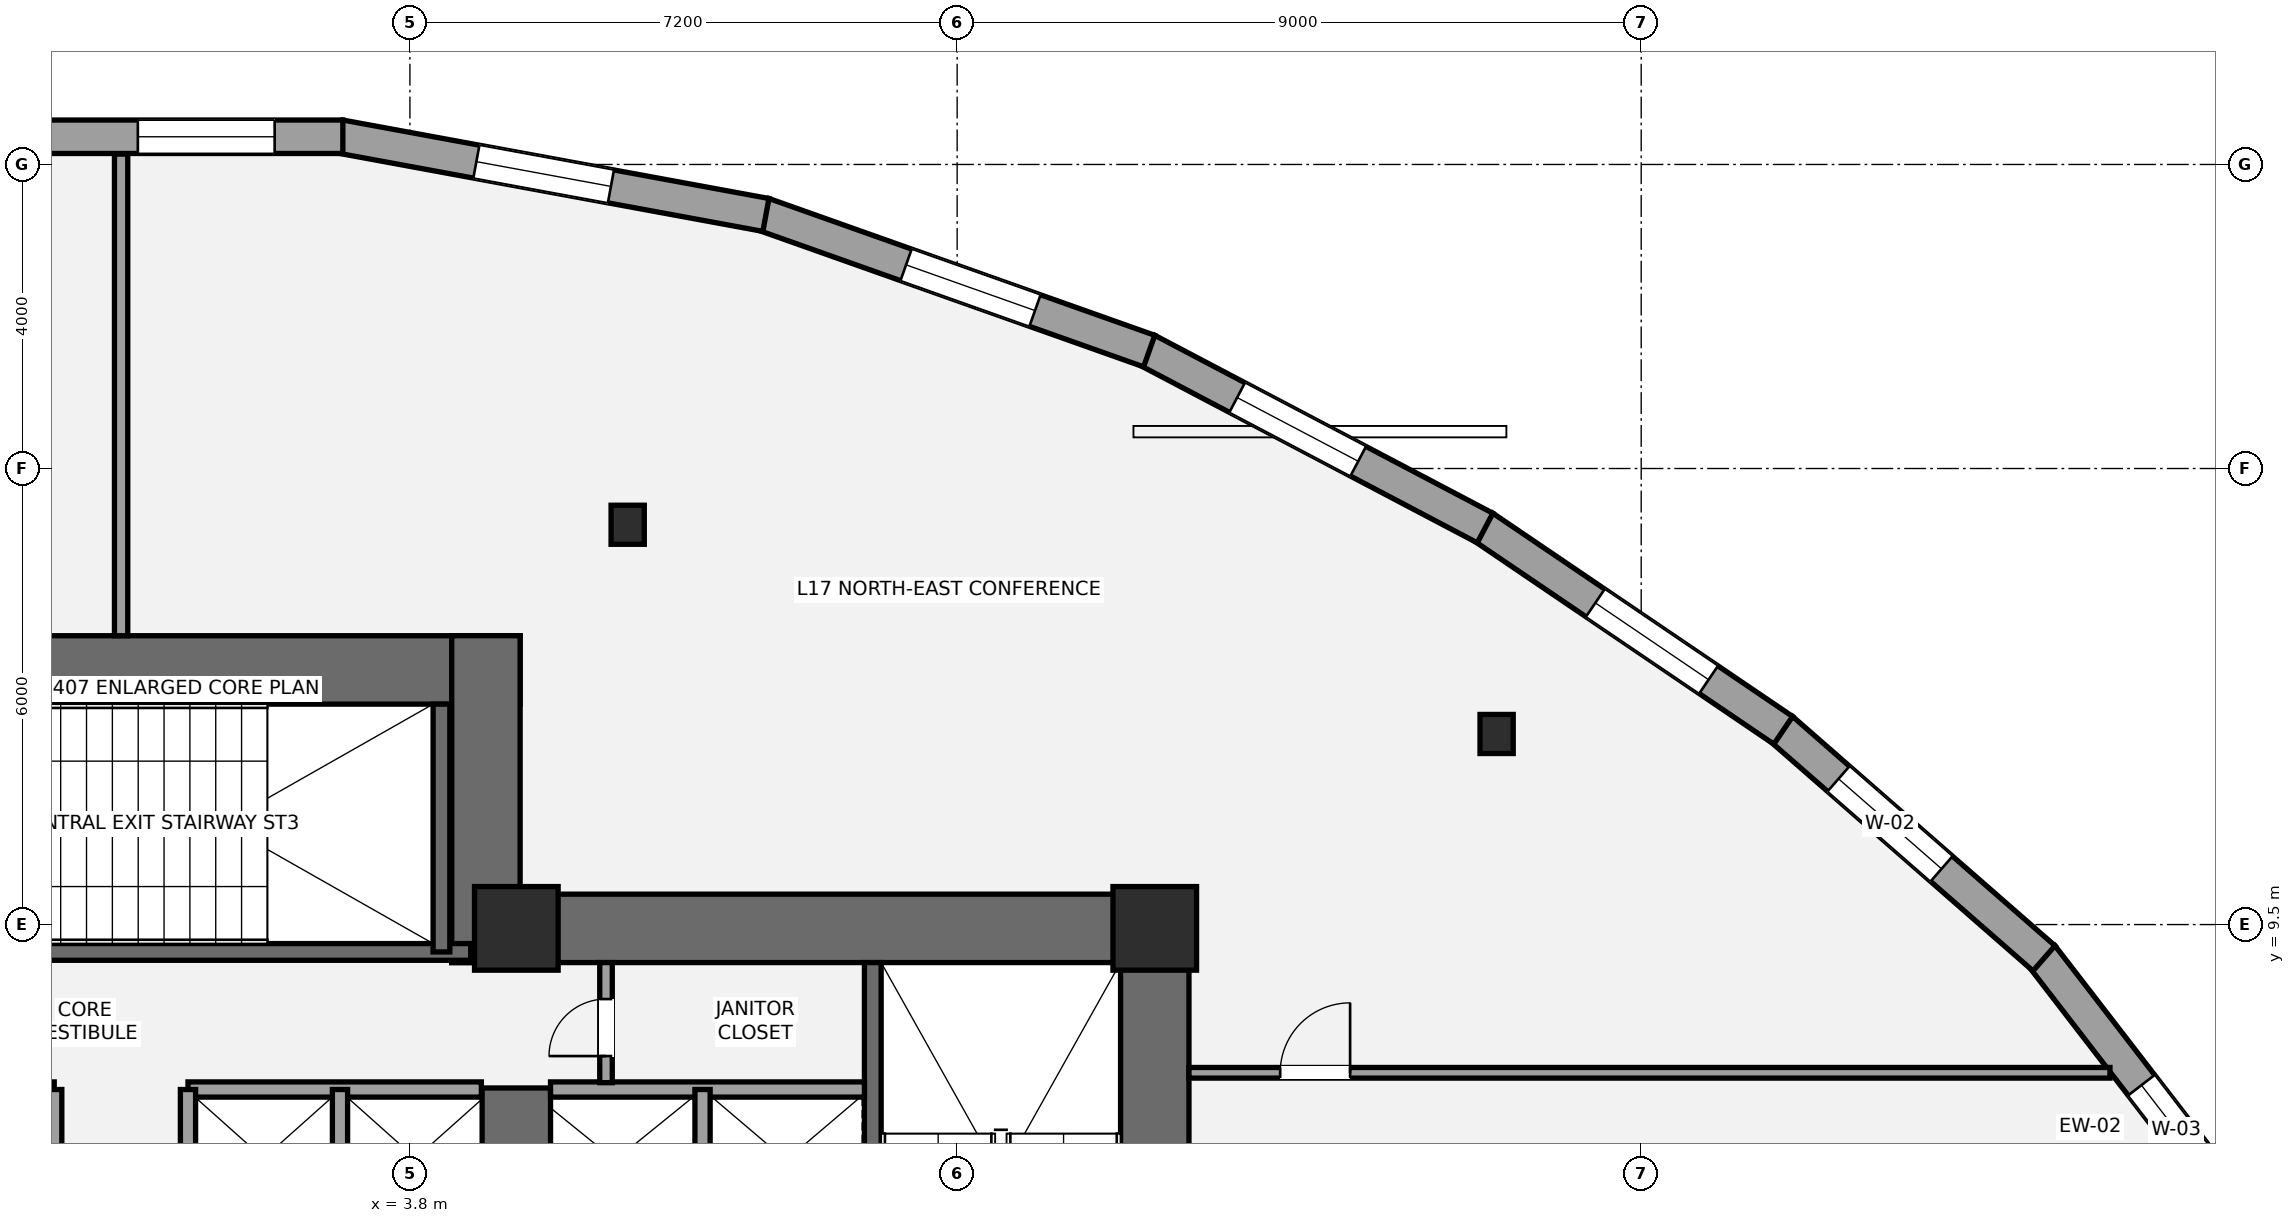
"""IFC4 building model, lengths in metres.
Left out: names, types, materials, properties, quantities, classifications, styles, units other than length and angle.
Written with IfcOpenShell. Run it as: python <this file> out.ifc"""

import sys

from ifc_helpers import new_model, si_unit, direction, frame, frame_2d, origin, origin_2d, place, context, subcontext, project, spatial, rectangle, i_section, extrude, element, fill, save


model = new_model("IFC4")
c1 = context("Model", 3, precision=1e-05, world=origin(), true_north=direction((0.0, 1.0)))
c2 = subcontext(c1, "Body", "Model", "MODEL_VIEW")
j1 = project(units=[si_unit("LENGTHUNIT", "METRE"), si_unit("PLANEANGLEUNIT", "RADIAN")], contexts=[c1])
p1 = place(None, origin())
s1 = spatial("IfcSite", under=j1, at=p1, CompositionType="ELEMENT")
p2 = place(p1, origin())
s2 = spatial("IfcBuilding", under=s1, at=p2, CompositionType="ELEMENT")
p3 = place(p2, frame((0.0, 0.0, 66.6)))
s3 = spatial("IfcBuildingStorey", under=s2, at=p3, CompositionType="ELEMENT", Elevation=66.6)
p4 = place(p3, frame((13.6, 0.95, 0.0), z_axis=(0.0, 0.0, 1.0), x_axis=(0.0, 1.0, 0.0)))
e1 = element("IfcWall", 1, at=p4, inside=s3, PredefinedType="SHEAR", context=c2, shape_type="SweptSolid", body=[
    extrude(rectangle(XDim=8.95, YDim=0.9, at=frame_2d((4.475, 0.0))), origin(), (0.0, 0.0, 1.0), 3.6),
])
p5 = place(p3, frame((4.35, 9.45, 0.0), z_axis=(0.0, 0.0, 1.0), x_axis=(1.0, 0.0, 0.0)))
e2 = element("IfcWall", 2, at=p5, inside=s3, PredefinedType="SHEAR", context=c2, shape_type="SweptSolid", body=[
    extrude(rectangle(XDim=9.7, YDim=0.9, at=frame_2d((4.85, 0.0))), origin(), (0.0, 0.0, 1.0), 3.6),
])
p6 = place(p3, frame((5.2, 5.35, 0.0), z_axis=(0.0, 0.0, 1.0), x_axis=(0.0, 1.0, 0.0)))
e3 = element("IfcWall", 3, at=p6, inside=s3, PredefinedType="SHEAR", context=c2, shape_type="SweptSolid", body=[
    extrude(rectangle(XDim=2.0, YDim=0.9, at=frame_2d((1.0, 0.0))), origin(), (0.0, 0.0, 1.0), 3.6),
])
p7 = place(p3, frame((9.89, 1.85, 0.0), z_axis=(0.0, 0.0, 1.0), x_axis=(0.0, 1.0, 0.0)))
e4 = element("IfcWall", 4, at=p7, inside=s3, PredefinedType="SHEAR", context=c2, shape_type="SweptSolid", body=[
    extrude(rectangle(XDim=7.15, YDim=0.22, at=frame_2d((3.575, 0.0))), origin(), (0.0, 0.0, 1.0), 3.6),
])
p8 = place(p3, frame((-5.25, 12.85, 0.0), z_axis=(0.0, 0.0, 1.0), x_axis=(1.0, 0.0, 0.0)))
e5 = element("IfcWall", 5, at=p8, inside=s3, PredefinedType="SHEAR", context=c2, shape_type="SweptSolid", body=[
    extrude(rectangle(XDim=10.5, YDim=0.9, at=frame_2d((5.25, 0.0))), origin(), (0.0, 0.0, 1.0), 3.6),
])
p9 = place(p3, frame((4.8, 9.0, 0.0), z_axis=(0.0, 0.0, 1.0), x_axis=(0.0, 1.0, 0.0)))
e6 = element("IfcWall", 6, at=p9, inside=s3, PredefinedType="SHEAR", context=c2, shape_type="SweptSolid", body=[
    extrude(rectangle(XDim=4.3, YDim=0.9, at=frame_2d((2.15, 0.0))), origin(), (0.0, 0.0, 1.0), 3.6),
])
p10 = place(p3, frame((-4.7, 9.14, 0.0), z_axis=(0.0, 0.0, 1.0), x_axis=(1.0, 0.0, 0.0)))
e7 = element("IfcWall", 7, at=p10, inside=s3, PredefinedType="SHEAR", context=c2, shape_type="SweptSolid", body=[
    extrude(rectangle(XDim=9.3, YDim=0.22, at=frame_2d((4.65, 0.0))), origin(), (0.0, 0.0, 1.0), 3.6),
])
p11 = place(p10, frame((1.15, 0.0, 0.0)))
e8 = element("IfcOpeningElement", 8, at=p11, cuts=e7, PredefinedType="OPENING", context=c2, shape_type="SweptSolid", body=[
    extrude(rectangle(XDim=1.05, YDim=2.15, at=frame_2d((0.525, 1.075))), frame((0.0, 0.12, 0.0), z_axis=(0.0, -1.0, 0.0), x_axis=(1.0, 0.0, 0.0)), (0.0, 0.0, 1.0), 0.24),
])
p12 = place(p3, frame((4.215, 9.14, 0.0), z_axis=(0.0, 0.0, 1.0), x_axis=(0.0, 1.0, 0.0)))
e9 = element("IfcWall", 9, at=p12, inside=s3, PredefinedType="SHEAR", context=c2, shape_type="SweptSolid", body=[
    extrude(rectangle(XDim=3.26, YDim=0.22, at=frame_2d((1.63, 0.0))), origin(), (0.0, 0.0, 1.0), 3.6),
])
for number, where, z_axis, x_axis in (
    (10, (5.2, 9.45, 0.0), (0.0, 0.0, 1.0), (1.0, 0.0, 0.0)),
    (11, (13.6, 9.45, 0.0), (0.0, 0.0, 1.0), (1.0, 0.0, 0.0)),
):
    element("IfcColumn", number, at=place(p3, frame(where, z_axis=z_axis, x_axis=x_axis)), inside=s3, PredefinedType="COLUMN", context=c2, shape_type="SweptSolid", body=[
        extrude(rectangle(XDim=1.1, YDim=1.1, at=origin_2d()), origin(), (0.0, 0.0, 1.0), 3.6),
    ])
for number, where, z_axis, x_axis in (
    (12, (18.098, 12.007, 0.0), (0.0, 0.0, 1.0), (1.0, 0.0, 0.0)),
    (13, (6.665, 14.76, 0.0), (0.0, 0.0, 1.0), (1.0, 0.0, 0.0)),
):
    element("IfcColumn", number, at=place(p3, frame(where, z_axis=z_axis, x_axis=x_axis)), inside=s3, PredefinedType="COLUMN", context=c2, shape_type="SweptSolid", body=[
        extrude(i_section(OverallWidth=0.437, OverallDepth=0.514, WebThickness=0.061, FlangeThickness=0.097, at=origin_2d()), origin(), (0.0, 0.0, 1.0), 3.6),
    ])
p13 = place(p3, frame((25.27, 9.087, 0.0), z_axis=(0.0, 0.0, 1.0), x_axis=(0.610684735824, -0.791873824187, 0.0)))
e14 = element("IfcWall", 14, at=p13, inside=s3, PredefinedType="STANDARD", context=c2, shape_type="SweptSolid", body=[
    extrude(rectangle(XDim=4.347, YDim=0.44, at=frame_2d((2.173, 0.0))), origin(), (0.0, 0.0, 1.0), 2.529),
])
p14 = place(p13, frame((2.147, 0.0, 0.65)))
e15 = element("IfcOpeningElement", 15, at=p14, cuts=e14, PredefinedType="OPENING", context=c2, shape_type="SweptSolid", body=[
    extrude(rectangle(XDim=1.5, YDim=1.7, at=frame_2d((0.75, 0.85))), frame((0.0, 0.23, 0.0), z_axis=(0.0, -1.0, 0.0), x_axis=(1.0, 0.0, 0.0)), (0.0, 0.0, 1.0), 0.46),
])
p15 = place(p3, frame((21.847, 12.072, 0.0), z_axis=(0.0, 0.0, 1.0), x_axis=(0.753064762529, -0.657946398605, 0.0)))
e16 = element("IfcWall", 16, at=p15, inside=s3, PredefinedType="STANDARD", context=c2, shape_type="SweptSolid", body=[
    extrude(rectangle(XDim=4.584, YDim=0.44, at=frame_2d((2.292, 0.0))), origin(), (0.0, 0.0, 1.0), 2.529),
])
p16 = place(p15, frame((0.995, 0.0, 0.65)))
e17 = element("IfcOpeningElement", 17, at=p16, cuts=e16, PredefinedType="OPENING", context=c2, shape_type="SweptSolid", body=[
    extrude(rectangle(XDim=1.8, YDim=1.7, at=frame_2d((0.9, 0.85))), frame((0.0, 0.23, 0.0), z_axis=(0.0, -1.0, 0.0), x_axis=(1.0, 0.0, 0.0)), (0.0, 0.0, 1.0), 0.46),
])
p17 = place(p3, frame((17.925, 14.729, 0.0), z_axis=(0.0, 0.0, 1.0), x_axis=(0.827689135004, -0.561186863528, 0.0)))
e18 = element("IfcWall", 18, at=p17, inside=s3, PredefinedType="STANDARD", context=c2, shape_type="SweptSolid", body=[
    extrude(rectangle(XDim=4.765, YDim=0.44, at=frame_2d((2.382, 0.0))), origin(), (0.0, 0.0, 1.0), 2.529),
])
p18 = place(p17, frame((1.778, 0.0, 0.65)))
e19 = element("IfcOpeningElement", 19, at=p18, cuts=e18, PredefinedType="OPENING", context=c2, shape_type="SweptSolid", body=[
    extrude(rectangle(XDim=1.8, YDim=1.7, at=frame_2d((0.9, 0.85))), frame((0.0, 0.23, 0.0), z_axis=(0.0, -1.0, 0.0), x_axis=(1.0, 0.0, 0.0)), (0.0, 0.0, 1.0), 0.46),
])
p19 = place(p3, frame((13.498, 17.058, 0.0), z_axis=(0.0, 0.0, 1.0), x_axis=(0.884937186938, -0.465710398395, 0.0)))
e20 = element("IfcWall", 20, at=p19, inside=s3, PredefinedType="STANDARD", context=c2, shape_type="SweptSolid", body=[
    extrude(rectangle(XDim=5.026, YDim=0.44, at=frame_2d((2.513, 0.0))), origin(), (0.0, 0.0, 1.0), 2.529),
])
p20 = place(p19, frame((1.341, 0.0, 0.65)))
e21 = element("IfcOpeningElement", 21, at=p20, cuts=e20, PredefinedType="OPENING", context=c2, shape_type="SweptSolid", body=[
    extrude(rectangle(XDim=1.8, YDim=1.7, at=frame_2d((0.9, 0.85))), frame((0.0, 0.23, 0.0), z_axis=(0.0, -1.0, 0.0), x_axis=(1.0, 0.0, 0.0)), (0.0, 0.0, 1.0), 0.46),
])
p21 = place(p3, frame((8.45, 18.845, 0.0), z_axis=(0.0, 0.0, 1.0), x_axis=(0.942515730584, -0.334161783575, 0.0)))
e22 = element("IfcWall", 22, at=p21, inside=s3, PredefinedType="STANDARD", context=c2, shape_type="SweptSolid", body=[
    extrude(rectangle(XDim=5.386, YDim=0.44, at=frame_2d((2.693, 0.0))), origin(), (0.0, 0.0, 1.0), 2.529),
])
p22 = place(p21, frame((1.992, 0.0, 0.65)))
e23 = element("IfcOpeningElement", 23, at=p22, cuts=e22, PredefinedType="OPENING", context=c2, shape_type="SweptSolid", body=[
    extrude(rectangle(XDim=1.8, YDim=1.7, at=frame_2d((0.9, 0.85))), frame((0.0, 0.23, 0.0), z_axis=(0.0, -1.0, 0.0), x_axis=(1.0, 0.0, 0.0)), (0.0, 0.0, 1.0), 0.46),
])
p23 = place(p3, frame((2.878, 19.868, 0.0), z_axis=(0.0, 0.0, 1.0), x_axis=(0.983468646836, -0.181078493177, 0.0)))
e24 = element("IfcWall", 24, at=p23, inside=s3, PredefinedType="STANDARD", context=c2, shape_type="SweptSolid", body=[
    extrude(rectangle(XDim=5.7, YDim=0.44, at=frame_2d((2.85, 0.0))), origin(), (0.0, 0.0, 1.0), 2.529),
])
p24 = place(p23, frame((1.827, 0.0, 0.65)))
e25 = element("IfcOpeningElement", 25, at=p24, cuts=e24, PredefinedType="OPENING", context=c2, shape_type="SweptSolid", body=[
    extrude(rectangle(XDim=1.8, YDim=1.7, at=frame_2d((0.9, 0.85))), frame((0.0, 0.23, 0.0), z_axis=(0.0, -1.0, 0.0), x_axis=(1.0, 0.0, 0.0)), (0.0, 0.0, 1.0), 0.46),
])
p25 = place(p3, frame((-2.917, 19.865, 0.0), z_axis=(0.0, 0.0, 1.0), x_axis=(1.0, 0.0, 0.0)))
e26 = element("IfcWall", 26, at=p25, inside=s3, PredefinedType="STANDARD", context=c2, shape_type="SweptSolid", body=[
    extrude(rectangle(XDim=5.835, YDim=0.44, at=frame_2d((2.917, 0.0))), origin(), (0.0, 0.0, 1.0), 2.529),
])
p26 = place(p25, frame((3.138, 0.0, 0.65)))
e27 = element("IfcOpeningElement", 27, at=p26, cuts=e26, PredefinedType="OPENING", context=c2, shape_type="SweptSolid", body=[
    extrude(rectangle(XDim=1.8, YDim=1.7, at=frame_2d((0.9, 0.85))), frame((0.0, 0.23, 0.0), z_axis=(0.0, -1.0, 0.0), x_axis=(1.0, 0.0, 0.0)), (0.0, 0.0, 1.0), 0.46),
])
p27 = place(p3, frame((5.65, 7.33, 0.0), z_axis=(0.0, 0.0, 1.0), x_axis=(1.0, 0.0, 0.0)))
e28 = element("IfcWall", 28, at=p27, inside=s3, PredefinedType="SOLIDWALL", context=c2, shape_type="SweptSolid", body=[
    extrude(rectangle(XDim=4.13, YDim=0.2, at=frame_2d((2.065, 0.0))), origin(), (0.0, 0.0, 1.0), 3.4),
])
p28 = place(p3, frame((7.65, 5.47, 0.0), z_axis=(0.0, 0.0, 1.0), x_axis=(0.0, 1.0, 0.0)))
e29 = element("IfcWall", 29, at=p28, inside=s3, PredefinedType="SOLIDWALL", context=c2, shape_type="SweptSolid", body=[
    extrude(rectangle(XDim=1.86, YDim=0.2, at=frame_2d((0.93, 0.0))), origin(), (0.0, 0.0, 1.0), 3.4),
])
for number, where, z_axis, x_axis in (
    (30, (-4.74, 7.33, 0.0), (0.0, 0.0, 1.0), (1.0, 0.0, 0.0)),
    (31, (0.88, 7.33, 0.0), (0.0, 0.0, 1.0), (1.0, 0.0, 0.0)),
):
    element("IfcWall", number, at=place(p3, frame(where, z_axis=z_axis, x_axis=x_axis)), inside=s3, PredefinedType="SOLIDWALL", context=c2, shape_type="SweptSolid", body=[
        extrude(rectangle(XDim=3.86, YDim=0.2, at=frame_2d((1.93, 0.0))), origin(), (0.0, 0.0, 1.0), 3.4),
    ])
for number, where, z_axis, x_axis in (
    (32, (2.88, 5.52, 0.0), (0.0, 0.0, 1.0), (0.0, 1.0, 0.0)),
    (33, (-0.88, 5.52, 0.0), (0.0, 0.0, 1.0), (0.0, 1.0, 0.0)),
    (34, (0.88, 5.52, 0.0), (0.0, 0.0, 1.0), (0.0, 1.0, 0.0)),
):
    element("IfcWall", number, at=place(p3, frame(where, z_axis=z_axis, x_axis=x_axis)), inside=s3, PredefinedType="SOLIDWALL", context=c2, shape_type="SweptSolid", body=[
        extrude(rectangle(XDim=1.81, YDim=0.2, at=frame_2d((0.905, 0.0))), origin(), (0.0, 0.0, 1.0), 3.4),
    ])
p29 = place(p3, frame((6.38, 7.42, 0.0), z_axis=(0.0, 0.0, 1.0), x_axis=(0.0, 1.0, 0.0)))
e35 = element("IfcWall", 35, at=p29, inside=s3, PredefinedType="PARTITIONING", context=c2, shape_type="SweptSolid", body=[
    extrude(rectangle(XDim=1.58, YDim=0.165, at=frame_2d((0.79, 0.0))), origin(), (0.0, 0.0, 1.0), 3.4),
])
p30 = place(p29, frame((0.35, 0.0, 0.0)))
e36 = element("IfcOpeningElement", 36, at=p30, cuts=e35, PredefinedType="OPENING", context=c2, shape_type="SweptSolid", body=[
    extrude(rectangle(XDim=0.75, YDim=2.1, at=frame_2d((0.375, 1.05))), frame((0.0, 0.093, 0.0), z_axis=(0.0, -1.0, 0.0), x_axis=(1.0, 0.0, 0.0)), (0.0, 0.0, 1.0), 0.185),
])
p31 = place(p3, frame((14.05, 7.55, 0.0), z_axis=(0.0, 0.0, 1.0), x_axis=(1.0, 0.0, 0.0)))
e37 = element("IfcWall", 37, at=p31, inside=s3, PredefinedType="PARTITIONING", context=c2, shape_type="SweptSolid", body=[
    extrude(rectangle(XDim=12.118, YDim=0.14, at=frame_2d((6.059, 0.0))), origin(), (0.0, 0.0, 1.0), 2.853),
])
p32 = place(p31, frame((1.2, 0.0, 0.0)))
e38 = element("IfcOpeningElement", 38, at=p32, cuts=e37, PredefinedType="OPENING", context=c2, shape_type="SweptSolid", body=[
    extrude(rectangle(XDim=0.92, YDim=2.15, at=frame_2d((0.46, 1.075))), frame((0.0, 0.08, 0.0), z_axis=(0.0, -1.0, 0.0), x_axis=(1.0, 0.0, 0.0)), (0.0, 0.0, 1.0), 0.16),
])
p33 = place(p3, frame((0.0, 13.3, 0.0), z_axis=(0.0, 0.0, 1.0), x_axis=(0.0, 1.0, 0.0)))
e39 = element("IfcWall", 39, at=p33, inside=s3, PredefinedType="PARTITIONING", context=c2, shape_type="SweptSolid", body=[
    extrude(rectangle(XDim=6.336, YDim=0.175, at=frame_2d((3.168, 0.0))), origin(), (0.0, 0.0, 1.0), 3.4),
])
p34 = place(p14, origin())
e40 = element("IfcWindow", 40, at=p34, inside=s3, PartitioningType="SINGLE_PANEL", PredefinedType="WINDOW", context=c2, shape_type="SweptSolid", body=[
    extrude(rectangle(XDim=1.5, YDim=1.7, at=frame_2d((0.75, 0.85))), frame((0.0, -0.01, 0.0), z_axis=(0.0, -1.0, 0.0), x_axis=(1.0, 0.0, 0.0)), (0.0, 0.0, 1.0), 0.06),
])
fill(e15, e40)
p35 = place(p16, origin())
e41 = element("IfcWindow", 41, at=p35, inside=s3, PartitioningType="SINGLE_PANEL", PredefinedType="WINDOW", context=c2, shape_type="SweptSolid", body=[
    extrude(rectangle(XDim=1.8, YDim=1.7, at=frame_2d((0.9, 0.85))), frame((0.0, -0.01, 0.0), z_axis=(0.0, -1.0, 0.0), x_axis=(1.0, 0.0, 0.0)), (0.0, 0.0, 1.0), 0.06),
])
fill(e17, e41)
p36 = place(p18, origin())
e42 = element("IfcWindow", 42, at=p36, inside=s3, PartitioningType="SINGLE_PANEL", PredefinedType="WINDOW", context=c2, shape_type="SweptSolid", body=[
    extrude(rectangle(XDim=1.8, YDim=1.7, at=frame_2d((0.9, 0.85))), frame((0.0, -0.01, 0.0), z_axis=(0.0, -1.0, 0.0), x_axis=(1.0, 0.0, 0.0)), (0.0, 0.0, 1.0), 0.06),
])
fill(e19, e42)
p37 = place(p20, origin())
e43 = element("IfcWindow", 43, at=p37, inside=s3, PartitioningType="SINGLE_PANEL", PredefinedType="WINDOW", context=c2, shape_type="SweptSolid", body=[
    extrude(rectangle(XDim=1.8, YDim=1.7, at=frame_2d((0.9, 0.85))), frame((0.0, -0.01, 0.0), z_axis=(0.0, -1.0, 0.0), x_axis=(1.0, 0.0, 0.0)), (0.0, 0.0, 1.0), 0.06),
])
fill(e21, e43)
p38 = place(p22, origin())
e44 = element("IfcWindow", 44, at=p38, inside=s3, PartitioningType="SINGLE_PANEL", PredefinedType="WINDOW", context=c2, shape_type="SweptSolid", body=[
    extrude(rectangle(XDim=1.8, YDim=1.7, at=frame_2d((0.9, 0.85))), frame((0.0, -0.01, 0.0), z_axis=(0.0, -1.0, 0.0), x_axis=(1.0, 0.0, 0.0)), (0.0, 0.0, 1.0), 0.06),
])
fill(e23, e44)
p39 = place(p24, origin())
e45 = element("IfcWindow", 45, at=p39, inside=s3, PartitioningType="SINGLE_PANEL", PredefinedType="WINDOW", context=c2, shape_type="SweptSolid", body=[
    extrude(rectangle(XDim=1.8, YDim=1.7, at=frame_2d((0.9, 0.85))), frame((0.0, -0.01, 0.0), z_axis=(0.0, -1.0, 0.0), x_axis=(1.0, 0.0, 0.0)), (0.0, 0.0, 1.0), 0.06),
])
fill(e25, e45)
p40 = place(p26, origin())
e46 = element("IfcWindow", 46, at=p40, inside=s3, PartitioningType="SINGLE_PANEL", PredefinedType="WINDOW", context=c2, shape_type="SweptSolid", body=[
    extrude(rectangle(XDim=1.8, YDim=1.7, at=frame_2d((0.9, 0.85))), frame((0.0, -0.01, 0.0), z_axis=(0.0, -1.0, 0.0), x_axis=(1.0, 0.0, 0.0)), (0.0, 0.0, 1.0), 0.06),
])
fill(e27, e46)
p41 = place(p30, origin())
e47 = element("IfcDoor", 47, at=p41, inside=s3, OperationType="SINGLE_SWING_LEFT", PredefinedType="DOOR", context=c2, shape_type="SweptSolid", body=[
    extrude(rectangle(XDim=0.75, YDim=2.1, at=frame_2d((0.375, 1.05))), frame((0.0, 0.025, 0.0), z_axis=(0.0, -1.0, 0.0), x_axis=(1.0, 0.0, 0.0)), (0.0, 0.0, 1.0), 0.05),
])
fill(e36, e47)
p42 = place(p32, origin())
e48 = element("IfcDoor", 48, at=p42, inside=s3, OperationType="SINGLE_SWING_RIGHT", PredefinedType="DOOR", context=c2, shape_type="SweptSolid", body=[
    extrude(rectangle(XDim=0.92, YDim=2.15, at=frame_2d((0.46, 1.075))), frame((0.0, 0.025, 0.0), z_axis=(0.0, -1.0, 0.0), x_axis=(1.0, 0.0, 0.0)), (0.0, 0.0, 1.0), 0.05),
])
fill(e38, e48)
save(model, sys.argv[1])
